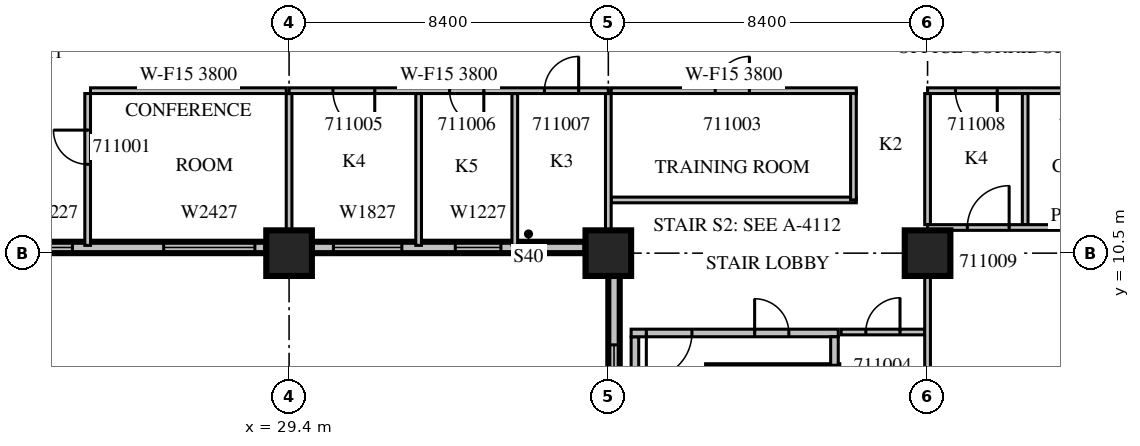
"""IFC4 building model, lengths in metres.
Left out: names, types, materials, properties, quantities, classifications, styles, units other than length and angle.
Written with IfcOpenShell. Run it as: python <this file> out.ifc"""

import sys

from ifc_helpers import new_model, si_unit, direction, frame, frame_2d, origin, origin_2d, place, context, subcontext, project, spatial, rectangle, extrude, source, transform, mapped, element, fill, save


model = new_model("IFC4")
c1 = context("Model", 3, precision=1e-05, world=origin(), true_north=direction((0.0, 1.0)))
c2 = subcontext(c1, "Body", "Model", "MODEL_VIEW")
j1 = project(units=[si_unit("LENGTHUNIT", "METRE"), si_unit("PLANEANGLEUNIT", "RADIAN")], contexts=[c1])
p1 = place(None, origin())
s1 = spatial("IfcSite", under=j1, at=p1, CompositionType="ELEMENT")
p2 = place(p1, origin())
s2 = spatial("IfcBuilding", under=s1, at=p2, CompositionType="ELEMENT")
p3 = place(p2, frame((0.0, 0.0, 57.3)))
s3 = spatial("IfcBuildingStorey", under=s2, at=p3, CompositionType="ELEMENT", Elevation=57.3)
m1 = source(origin(), c2, "Body", "SweptSolid", [
    extrude(rectangle(XDim=1.2, YDim=1.2, at=origin_2d()), origin(), (0.0, 0.0, 1.0), 4.2),
])
for number, where, z_axis, x_axis in (
    (1, (29.4, 10.5, 0.0), (0.0, 0.0, 1.0), (1.0, 0.0, 0.0)),
    (2, (37.8, 10.5, 0.0), (0.0, 0.0, 1.0), (1.0, 0.0, 0.0)),
    (3, (46.2, 10.5, 0.0), (0.0, 0.0, 1.0), (1.0, 0.0, 0.0)),
):
    element("IfcColumn", number, at=place(p3, frame(where, z_axis=z_axis, x_axis=x_axis)), inside=s3, PredefinedType="COLUMN", context=c2, shape_type="MappedRepresentation", body=[
        mapped(m1, transform((0.0, 0.0, 0.0), scale=1.0)),
    ])
m2 = source(origin(), c2, "Body", "SweptSolid", [
    extrude(rectangle(XDim=6.6, YDim=0.3, at=frame_2d((3.3, 0.0))), origin(), (0.0, 0.0, 1.0), 3.8),
])
p4 = place(p3, frame((22.2, 10.65, 0.0), z_axis=(0.0, 0.0, 1.0), x_axis=(1.0, 0.0, 0.0)))
e4 = element("IfcWall", 4, at=p4, inside=s3, PredefinedType="STANDARD", context=c2, shape_type="MappedRepresentation", body=[
    mapped(m2, transform((0.0, 0.0, 0.0), scale=1.0)),
])
m3 = source(origin(), c2, "Body", "SweptSolid", [
    extrude(rectangle(XDim=1.2, YDim=2.7, at=frame_2d((0.6, 1.35))), frame((0.0, 0.16, 0.0), z_axis=(0.0, -1.0, 0.0), x_axis=(1.0, 0.0, 0.0)), (0.0, 0.0, 1.0), 0.32),
])
p5 = place(p4, frame((0.3, 0.0, 0.6)))
e5 = element("IfcOpeningElement", 5, at=p5, cuts=e4, PredefinedType="OPENING", context=c2, shape_type="MappedRepresentation", body=[
    mapped(m3, transform((0.0, 0.0, 0.0), scale=1.0)),
])
m4 = source(origin(), c2, "Body", "SweptSolid", [
    extrude(rectangle(XDim=2.4, YDim=2.7, at=frame_2d((1.2, 1.35))), frame((0.0, 0.16, 0.0), z_axis=(0.0, -1.0, 0.0), x_axis=(1.0, 0.0, 0.0)), (0.0, 0.0, 1.0), 0.32),
])
p6 = place(p4, frame((3.9, 0.0, 0.6)))
e6 = element("IfcOpeningElement", 6, at=p6, cuts=e4, PredefinedType="OPENING", context=c2, shape_type="MappedRepresentation", body=[
    mapped(m4, transform((0.0, 0.0, 0.0), scale=1.0)),
])
m5 = source(origin(), c2, "Body", "SweptSolid", [
    extrude(rectangle(XDim=7.2, YDim=0.3, at=frame_2d((3.6, 0.0))), origin(), (0.0, 0.0, 1.0), 3.8),
])
p7 = place(p3, frame((30.0, 10.65, 0.0), z_axis=(0.0, 0.0, 1.0), x_axis=(1.0, 0.0, 0.0)))
e7 = element("IfcWall", 7, at=p7, inside=s3, PredefinedType="STANDARD", context=c2, shape_type="MappedRepresentation", body=[
    mapped(m5, transform((0.0, 0.0, 0.0), scale=1.0)),
])
m6 = source(origin(), c2, "Body", "SweptSolid", [
    extrude(rectangle(XDim=1.8, YDim=2.7, at=frame_2d((0.9, 1.35))), frame((0.0, 0.16, 0.0), z_axis=(0.0, -1.0, 0.0), x_axis=(1.0, 0.0, 0.0)), (0.0, 0.0, 1.0), 0.32),
])
p8 = place(p7, frame((0.567, 0.0, 0.6)))
e8 = element("IfcOpeningElement", 8, at=p8, cuts=e7, PredefinedType="OPENING", context=c2, shape_type="MappedRepresentation", body=[
    mapped(m6, transform((0.0, 0.0, 0.0), scale=1.0)),
])
p9 = place(p7, frame((3.774, 0.0, 0.6)))
e9 = element("IfcOpeningElement", 9, at=p9, cuts=e7, PredefinedType="OPENING", context=c2, shape_type="MappedRepresentation", body=[
    mapped(m3, transform((0.0, 0.0, 0.0), scale=1.0)),
])
m7 = source(origin(), c2, "Body", "SweptSolid", [
    extrude(rectangle(XDim=8.7, YDim=0.3, at=frame_2d((4.35, 0.0))), origin(), (0.0, 0.0, 1.0), 3.8),
])
p10 = place(p3, frame((37.95, 9.9, 0.0), z_axis=(0.0, 0.0, 1.0), x_axis=(0.0, -1.0, 0.0)))
e10 = element("IfcWall", 10, at=p10, inside=s3, PredefinedType="STANDARD", context=c2, shape_type="MappedRepresentation", body=[
    mapped(m7, transform((0.0, 0.0, 0.0), scale=1.0)),
])
p11 = place(p10, frame((1.812, 0.0, 0.6)))
e11 = element("IfcOpeningElement", 11, at=p11, cuts=e10, PredefinedType="OPENING", context=c2, shape_type="MappedRepresentation", body=[
    mapped(m6, transform((0.0, 0.0, 0.0), scale=1.0)),
])
p12 = place(p10, frame((6.075, 0.0, 0.6)))
e12 = element("IfcOpeningElement", 12, at=p12, cuts=e10, PredefinedType="OPENING", context=c2, shape_type="MappedRepresentation", body=[
    mapped(m4, transform((0.0, 0.0, 0.0), scale=1.0)),
])
m8 = source(origin(), c2, "Body", "SweptSolid", [
    extrude(rectangle(XDim=3.45, YDim=0.25, at=frame_2d((1.725, 0.0))), origin(), (0.0, 0.0, 1.0), 3.8),
])
p13 = place(p3, frame((40.4, 7.425, 0.0), z_axis=(0.0, 0.0, 1.0), x_axis=(1.0, 0.0, 0.0)))
e13 = element("IfcWall", 13, at=p13, inside=s3, PredefinedType="SOLIDWALL", context=c2, shape_type="MappedRepresentation", body=[
    mapped(m8, transform((0.0, 0.0, 0.0), scale=1.0)),
])
m9 = source(origin(), c2, "Body", "SweptSolid", [
    extrude(rectangle(XDim=8.0, YDim=0.2, at=frame_2d((4.0, 0.0))), origin(), (0.0, 0.0, 1.0), 3.8),
])
p14 = place(p3, frame((38.5, 0.3, 0.0), z_axis=(0.0, 0.0, 1.0), x_axis=(0.0, 1.0, 0.0)))
e14 = element("IfcWall", 14, at=p14, inside=s3, PredefinedType="PARTITIONING", context=c2, shape_type="MappedRepresentation", body=[
    mapped(m9, transform((0.0, 0.0, 0.0), scale=1.0)),
])
m10 = source(origin(), c2, "Body", "SweptSolid", [
    extrude(rectangle(XDim=5.45, YDim=0.2, at=frame_2d((2.725, 0.0))), origin(), (0.0, 0.0, 1.0), 3.8),
])
p15 = place(p3, frame((38.4, 8.4, 0.0), z_axis=(0.0, 0.0, 1.0), x_axis=(1.0, 0.0, 0.0)))
e15 = element("IfcWall", 15, at=p15, inside=s3, PredefinedType="PARTITIONING", context=c2, shape_type="MappedRepresentation", body=[
    mapped(m10, transform((0.0, 0.0, 0.0), scale=1.0)),
])
m11 = source(origin(), c2, "Body", "SweptSolid", [
    extrude(rectangle(XDim=1.2, YDim=2.1, at=frame_2d((0.6, 1.05))), frame((0.0, 0.11, 0.0), z_axis=(0.0, -1.0, 0.0), x_axis=(1.0, 0.0, 0.0)), (0.0, 0.0, 1.0), 0.22),
])
p16 = place(p15, frame((0.4, 0.0, 0.0)))
e16 = element("IfcOpeningElement", 16, at=p16, cuts=e15, PredefinedType="OPENING", context=c2, shape_type="MappedRepresentation", body=[
    mapped(m11, transform((0.0, 0.0, 0.0), scale=1.0)),
])
m12 = source(origin(), c2, "Body", "SweptSolid", [
    extrude(rectangle(XDim=0.9, YDim=2.1, at=frame_2d((0.45, 1.05))), frame((0.0, 0.11, 0.0), z_axis=(0.0, -1.0, 0.0), x_axis=(1.0, 0.0, 0.0)), (0.0, 0.0, 1.0), 0.22),
])
p17 = place(p15, frame((3.25, 0.0, 0.0)))
e17 = element("IfcOpeningElement", 17, at=p17, cuts=e15, PredefinedType="OPENING", context=c2, shape_type="MappedRepresentation", body=[
    mapped(m12, transform((0.0, 0.0, 0.0), scale=1.0)),
])
m13 = source(origin(), c2, "Body", "SweptSolid", [
    extrude(rectangle(XDim=0.75, YDim=0.2, at=frame_2d((0.375, 0.0))), origin(), (0.0, 0.0, 1.0), 3.8),
])
p18 = place(p3, frame((43.75, 7.55, 0.0), z_axis=(0.0, 0.0, 1.0), x_axis=(0.0, 1.0, 0.0)))
e18 = element("IfcWall", 18, at=p18, inside=s3, PredefinedType="PARTITIONING", context=c2, shape_type="MappedRepresentation", body=[
    mapped(m13, transform((0.0, 0.0, 0.0), scale=1.0)),
])
p19 = place(p3, frame((24.1, 14.7, 0.0), z_axis=(0.0, 0.0, 1.0), x_axis=(0.0, -1.0, 0.0)))
e19 = element("IfcWall", 19, at=p19, inside=s3, PredefinedType="PARTITIONING", context=c2, shape_type="SweptSolid", body=[
    extrude(rectangle(XDim=3.995, YDim=0.15, at=frame_2d((1.998, 0.0))), origin(), (0.0, 0.0, 1.0), 3.8),
])
m14 = source(origin(), c2, "Body", "SweptSolid", [
    extrude(rectangle(XDim=0.9, YDim=2.1, at=frame_2d((0.45, 1.05))), frame((0.0, 0.085, 0.0), z_axis=(0.0, -1.0, 0.0), x_axis=(1.0, 0.0, 0.0)), (0.0, 0.0, 1.0), 0.17),
])
p20 = place(p19, frame((0.963, 0.0, 0.0)))
e20 = element("IfcOpeningElement", 20, at=p20, cuts=e19, PredefinedType="OPENING", context=c2, shape_type="MappedRepresentation", body=[
    mapped(m14, transform((0.0, 0.0, 0.0), scale=1.0)),
])
m15 = source(origin(), c2, "Body", "SweptSolid", [
    extrude(rectangle(XDim=5.15, YDim=0.15, at=frame_2d((2.575, 0.0))), origin(), (0.0, 0.0, 1.0), 3.8),
])
p21 = place(p3, frame((29.325, 14.775, 0.0), z_axis=(0.0, 0.0, 1.0), x_axis=(-1.0, 0.0, 0.0)))
e21 = element("IfcWall", 21, at=p21, inside=s3, PredefinedType="PARTITIONING", context=c2, shape_type="MappedRepresentation", body=[
    mapped(m15, transform((0.0, 0.0, 0.0), scale=1.0)),
])
p22 = place(p3, frame((29.4, 11.099, 0.0), z_axis=(0.0, 0.0, 1.0), x_axis=(0.0, 1.0, 0.0)))
e22 = element("IfcWall", 22, at=p22, inside=s3, PredefinedType="PARTITIONING", context=c2, shape_type="SweptSolid", body=[
    extrude(rectangle(XDim=3.601, YDim=0.15, at=frame_2d((1.8, 0.0))), origin(), (0.0, 0.0, 1.0), 3.8),
])
m16 = source(origin(), c2, "Body", "SweptSolid", [
    extrude(rectangle(XDim=6.45, YDim=0.15, at=frame_2d((3.225, 0.0))), origin(), (0.0, 0.0, 1.0), 3.8),
])
p23 = place(p3, frame((37.875, 11.9, 0.0), z_axis=(0.0, 0.0, 1.0), x_axis=(1.0, 0.0, 0.0)))
e23 = element("IfcWall", 23, at=p23, inside=s3, PredefinedType="PARTITIONING", context=c2, shape_type="MappedRepresentation", body=[
    mapped(m16, transform((0.0, 0.0, 0.0), scale=1.0)),
])
p24 = place(p3, frame((44.25, 11.9, 0.0), z_axis=(0.0, 0.0, 1.0), x_axis=(0.0, 1.0, 0.0)))
e24 = element("IfcWall", 24, at=p24, inside=s3, PredefinedType="PARTITIONING", context=c2, shape_type="SweptSolid", body=[
    extrude(rectangle(XDim=2.875, YDim=0.15, at=frame_2d((1.438, 0.0))), origin(), (0.0, 0.0, 1.0), 3.8),
])
p25 = place(p3, frame((44.325, 14.775, 0.0), z_axis=(0.0, 0.0, 1.0), x_axis=(-1.0, 0.0, 0.0)))
e25 = element("IfcWall", 25, at=p25, inside=s3, PredefinedType="PARTITIONING", context=c2, shape_type="MappedRepresentation", body=[
    mapped(m16, transform((0.0, 0.0, 0.0), scale=1.0)),
])
p26 = place(p25, frame((2.812, 0.0, 0.0)))
e26 = element("IfcOpeningElement", 26, at=p26, cuts=e25, PredefinedType="OPENING", context=c2, shape_type="MappedRepresentation", body=[
    mapped(m14, transform((0.0, 0.0, 0.0), scale=1.0)),
])
m17 = source(origin(), c2, "Body", "SweptSolid", [
    extrude(rectangle(XDim=2.2, YDim=0.15, at=frame_2d((1.1, 0.0))), origin(), (0.0, 0.0, 1.0), 3.8),
])
p27 = place(p3, frame((46.125, 8.425, 0.0), z_axis=(0.0, 0.0, 1.0), x_axis=(-1.0, 0.0, 0.0)))
e27 = element("IfcWall", 27, at=p27, inside=s3, PredefinedType="PARTITIONING", context=c2, shape_type="MappedRepresentation", body=[
    mapped(m17, transform((0.0, 0.0, 0.0), scale=1.0)),
])
p28 = place(p27, frame((0.65, 0.0, 0.0)))
e28 = element("IfcOpeningElement", 28, at=p28, cuts=e27, PredefinedType="OPENING", context=c2, shape_type="MappedRepresentation", body=[
    mapped(m14, transform((0.0, 0.0, 0.0), scale=1.0)),
])
m18 = source(origin(), c2, "Body", "SweptSolid", [
    extrude(rectangle(XDim=3.995, YDim=0.15, at=frame_2d((1.998, 0.0))), origin(), (0.0, 0.0, 1.0), 3.8),
])
for number, where, z_axis, x_axis in (
    (29, (32.809, 10.705, 0.0), (0.0, 0.0, 1.0), (0.0, 1.0, 0.0)),
    (30, (35.339, 10.705, 0.0), (0.0, 0.0, 1.0), (0.0, 1.0, 0.0)),
):
    element("IfcWall", number, at=place(p3, frame(where, z_axis=z_axis, x_axis=x_axis)), inside=s3, PredefinedType="PARTITIONING", context=c2, shape_type="MappedRepresentation", body=[
        mapped(m18, transform((0.0, 0.0, 0.0), scale=1.0)),
    ])
m19 = source(origin(), c2, "Body", "SweptSolid", [
    extrude(rectangle(XDim=3.601, YDim=0.15, at=frame_2d((1.8, 0.0))), origin(), (0.0, 0.0, 1.0), 3.8),
])
p29 = place(p3, frame((37.8, 11.099, 0.0), z_axis=(0.0, 0.0, 1.0), x_axis=(0.0, 1.0, 0.0)))
e31 = element("IfcWall", 31, at=p29, inside=s3, PredefinedType="PARTITIONING", context=c2, shape_type="MappedRepresentation", body=[
    mapped(m19, transform((0.0, 0.0, 0.0), scale=1.0)),
])
p30 = place(p3, frame((48.768, 11.25, 0.0), z_axis=(0.0, 0.0, 1.0), x_axis=(0.0, 1.0, 0.0)))
e32 = element("IfcWall", 32, at=p30, inside=s3, PredefinedType="PARTITIONING", context=c2, shape_type="SweptSolid", body=[
    extrude(rectangle(XDim=3.45, YDim=0.15, at=frame_2d((1.725, 0.0))), origin(), (0.0, 0.0, 1.0), 3.8),
])
m20 = source(origin(), c2, "Body", "SweptSolid", [
    extrude(rectangle(XDim=8.702, YDim=0.15, at=frame_2d((4.351, 0.0))), origin(), (0.0, 0.0, 1.0), 3.8),
])
p31 = place(p3, frame((46.2, 1.199, 0.0), z_axis=(0.0, 0.0, 1.0), x_axis=(0.0, 1.0, 0.0)))
e33 = element("IfcWall", 33, at=p31, inside=s3, PredefinedType="PARTITIONING", context=c2, shape_type="MappedRepresentation", body=[
    mapped(m20, transform((0.0, 0.0, 0.0), scale=1.0)),
])
m21 = source(origin(), c2, "Body", "SweptSolid", [
    extrude(rectangle(XDim=3.45, YDim=0.15, at=frame_2d((1.725, 0.0))), origin(), (0.0, 0.0, 1.0), 3.8),
])
p32 = place(p3, frame((46.2, 11.25, 0.0), z_axis=(0.0, 0.0, 1.0), x_axis=(0.0, 1.0, 0.0)))
e34 = element("IfcWall", 34, at=p32, inside=s3, PredefinedType="PARTITIONING", context=c2, shape_type="MappedRepresentation", body=[
    mapped(m21, transform((0.0, 0.0, 0.0), scale=1.0)),
])
m22 = source(origin(), c2, "Body", "SweptSolid", [
    extrude(rectangle(XDim=24.9, YDim=0.15, at=frame_2d((12.45, 0.0))), origin(), (0.0, 0.0, 1.0), 3.8),
])
p33 = place(p3, frame((71.1, 11.175, 0.0), z_axis=(0.0, 0.0, 1.0), x_axis=(-1.0, 0.0, 0.0)))
e35 = element("IfcWall", 35, at=p33, inside=s3, PredefinedType="PARTITIONING", context=c2, shape_type="MappedRepresentation", body=[
    mapped(m22, transform((0.0, 0.0, 0.0), scale=1.0)),
])
m23 = source(origin(), c2, "Body", "SweptSolid", [
    extrude(rectangle(XDim=1.1, YDim=2.1, at=frame_2d((0.55, 1.05))), frame((0.0, 0.085, 0.0), z_axis=(0.0, -1.0, 0.0), x_axis=(1.0, 0.0, 0.0)), (0.0, 0.0, 1.0), 0.17),
])
p34 = place(p33, frame((22.753, 0.0, 0.0)))
e36 = element("IfcOpeningElement", 36, at=p34, cuts=e35, PredefinedType="OPENING", context=c2, shape_type="MappedRepresentation", body=[
    mapped(m23, transform((0.0, 0.0, 0.0), scale=1.0)),
])
p35 = place(p33, frame((8.683, 0.0, 0.0)))
e37 = element("IfcOpeningElement", 37, at=p35, cuts=e35, PredefinedType="OPENING", context=c2, shape_type="MappedRepresentation", body=[
    mapped(m23, transform((0.0, 0.0, 0.0), scale=1.0)),
])
p36 = place(p33, frame((4.738, 0.0, 0.0)))
e38 = element("IfcOpeningElement", 38, at=p36, cuts=e35, PredefinedType="OPENING", context=c2, shape_type="MappedRepresentation", body=[
    mapped(m23, transform((0.0, 0.0, 0.0), scale=1.0)),
])
m24 = source(origin(), c2, "Body", "SweptSolid", [
    extrude(rectangle(XDim=8.4, YDim=0.15, at=frame_2d((4.2, 0.0))), origin(), (0.0, 0.0, 1.0), 3.8),
])
p37 = place(p3, frame((37.8, 14.775, 0.0), z_axis=(0.0, 0.0, 1.0), x_axis=(-1.0, 0.0, 0.0)))
e39 = element("IfcWall", 39, at=p37, inside=s3, PredefinedType="PARTITIONING", context=c2, shape_type="MappedRepresentation", body=[
    mapped(m24, transform((0.0, 0.0, 0.0), scale=1.0)),
])
p38 = place(p37, frame((6.146, 0.0, 0.0)))
e40 = element("IfcOpeningElement", 40, at=p38, cuts=e39, PredefinedType="OPENING", context=c2, shape_type="MappedRepresentation", body=[
    mapped(m23, transform((0.0, 0.0, 0.0), scale=1.0)),
])
p39 = place(p37, frame((3.276, 0.0, 0.0)))
e41 = element("IfcOpeningElement", 41, at=p39, cuts=e39, PredefinedType="OPENING", context=c2, shape_type="MappedRepresentation", body=[
    mapped(m14, transform((0.0, 0.0, 0.0), scale=1.0)),
])
p40 = place(p37, frame((0.781, 0.0, 0.0)))
e42 = element("IfcOpeningElement", 42, at=p40, cuts=e39, PredefinedType="OPENING", context=c2, shape_type="MappedRepresentation", body=[
    mapped(m14, transform((0.0, 0.0, 0.0), scale=1.0)),
])
p41 = place(p3, frame((71.1, 14.775, 0.0), z_axis=(0.0, 0.0, 1.0), x_axis=(-1.0, 0.0, 0.0)))
e43 = element("IfcWall", 43, at=p41, inside=s3, PredefinedType="PARTITIONING", context=c2, shape_type="MappedRepresentation", body=[
    mapped(m22, transform((0.0, 0.0, 0.0), scale=1.0)),
])
p42 = place(p41, frame((23.066, 0.0, 0.0)))
e44 = element("IfcOpeningElement", 44, at=p42, cuts=e43, PredefinedType="OPENING", context=c2, shape_type="MappedRepresentation", body=[
    mapped(m23, transform((0.0, 0.0, 0.0), scale=1.0)),
])
p43 = place(p41, frame((20.226, 0.0, 0.0)))
e45 = element("IfcOpeningElement", 45, at=p43, cuts=e43, PredefinedType="OPENING", context=c2, shape_type="MappedRepresentation", body=[
    mapped(m14, transform((0.0, 0.0, 0.0), scale=1.0)),
])
p44 = place(p41, frame((8.42, 0.0, 0.0)))
e46 = element("IfcOpeningElement", 46, at=p44, cuts=e43, PredefinedType="OPENING", context=c2, shape_type="MappedRepresentation", body=[
    mapped(m23, transform((0.0, 0.0, 0.0), scale=1.0)),
])
p45 = place(p41, frame((15.63, 0.0, 0.0)))
e47 = element("IfcOpeningElement", 47, at=p45, cuts=e43, PredefinedType="OPENING", context=c2, shape_type="MappedRepresentation", body=[
    mapped(m14, transform((0.0, 0.0, 0.0), scale=1.0)),
])
p46 = place(p41, frame((11.46, 0.0, 0.0)))
e48 = element("IfcOpeningElement", 48, at=p46, cuts=e43, PredefinedType="OPENING", context=c2, shape_type="MappedRepresentation", body=[
    mapped(m14, transform((0.0, 0.0, 0.0), scale=1.0)),
])
p47 = place(p41, frame((5.051, 0.0, 0.0)))
e49 = element("IfcOpeningElement", 49, at=p47, cuts=e43, PredefinedType="OPENING", context=c2, shape_type="MappedRepresentation", body=[
    mapped(m23, transform((0.0, 0.0, 0.0), scale=1.0)),
])
p48 = place(p41, frame((1.483, 0.0, 0.0)))
e50 = element("IfcOpeningElement", 50, at=p48, cuts=e43, PredefinedType="OPENING", context=c2, shape_type="MappedRepresentation", body=[
    mapped(m14, transform((0.0, 0.0, 0.0), scale=1.0)),
])
m25 = source(origin(), c2, "Body", "SweptSolid", [
    extrude(rectangle(XDim=1.2, YDim=2.7, at=frame_2d((0.6, 1.35))), frame((0.0, 0.03, 0.0), z_axis=(0.0, -1.0, 0.0), x_axis=(1.0, 0.0, 0.0)), (0.0, 0.0, 1.0), 0.06),
])
p49 = place(p5, origin())
e51 = element("IfcWindow", 51, at=p49, inside=s3, PartitioningType="SINGLE_PANEL", PredefinedType="WINDOW", context=c2, shape_type="MappedRepresentation", body=[
    mapped(m25, transform((0.0, 0.0, 0.0), scale=1.0)),
])
fill(e5, e51)
m26 = source(origin(), c2, "Body", "SweptSolid", [
    extrude(rectangle(XDim=2.4, YDim=2.7, at=frame_2d((1.2, 1.35))), frame((0.0, 0.03, 0.0), z_axis=(0.0, -1.0, 0.0), x_axis=(1.0, 0.0, 0.0)), (0.0, 0.0, 1.0), 0.06),
])
p50 = place(p6, origin())
e52 = element("IfcWindow", 52, at=p50, inside=s3, PartitioningType="SINGLE_PANEL", PredefinedType="WINDOW", context=c2, shape_type="MappedRepresentation", body=[
    mapped(m26, transform((0.0, 0.0, 0.0), scale=1.0)),
])
fill(e6, e52)
m27 = source(origin(), c2, "Body", "SweptSolid", [
    extrude(rectangle(XDim=1.8, YDim=2.7, at=frame_2d((0.9, 1.35))), frame((0.0, 0.03, 0.0), z_axis=(0.0, -1.0, 0.0), x_axis=(1.0, 0.0, 0.0)), (0.0, 0.0, 1.0), 0.06),
])
p51 = place(p8, origin())
e53 = element("IfcWindow", 53, at=p51, inside=s3, PartitioningType="SINGLE_PANEL", PredefinedType="WINDOW", context=c2, shape_type="MappedRepresentation", body=[
    mapped(m27, transform((0.0, 0.0, 0.0), scale=1.0)),
])
fill(e8, e53)
p52 = place(p9, origin())
e54 = element("IfcWindow", 54, at=p52, inside=s3, PartitioningType="SINGLE_PANEL", PredefinedType="WINDOW", context=c2, shape_type="MappedRepresentation", body=[
    mapped(m25, transform((0.0, 0.0, 0.0), scale=1.0)),
])
fill(e9, e54)
p53 = place(p11, origin())
e55 = element("IfcWindow", 55, at=p53, inside=s3, PartitioningType="SINGLE_PANEL", PredefinedType="WINDOW", context=c2, shape_type="MappedRepresentation", body=[
    mapped(m27, transform((0.0, 0.0, 0.0), scale=1.0)),
])
fill(e11, e55)
m28 = source(origin(), c2, "Body", "SweptSolid", [
    extrude(rectangle(XDim=1.2, YDim=2.1, at=frame_2d((0.6, 1.05))), frame((0.0, 0.025, 0.0), z_axis=(0.0, -1.0, 0.0), x_axis=(1.0, 0.0, 0.0)), (0.0, 0.0, 1.0), 0.05),
])
p54 = place(p16, origin())
e56 = element("IfcDoor", 56, at=p54, inside=s3, OperationType="SINGLE_SWING_RIGHT", PredefinedType="DOOR", context=c2, shape_type="MappedRepresentation", body=[
    mapped(m28, transform((0.0, 0.0, 0.0), scale=1.0)),
])
fill(e16, e56)
m29 = source(origin(), c2, "Body", "SweptSolid", [
    extrude(rectangle(XDim=0.9, YDim=2.1, at=frame_2d((0.45, 1.05))), frame((0.0, 0.025, 0.0), z_axis=(0.0, -1.0, 0.0), x_axis=(1.0, 0.0, 0.0)), (0.0, 0.0, 1.0), 0.05),
])
p55 = place(p17, origin())
e57 = element("IfcDoor", 57, at=p55, inside=s3, OperationType="SINGLE_SWING_LEFT", PredefinedType="DOOR", context=c2, shape_type="MappedRepresentation", body=[
    mapped(m29, transform((0.0, 0.0, 0.0), scale=1.0)),
])
fill(e17, e57)
p56 = place(p20, origin())
e58 = element("IfcDoor", 58, at=p56, inside=s3, OperationType="SINGLE_SWING_RIGHT", PredefinedType="DOOR", context=c2, shape_type="MappedRepresentation", body=[
    mapped(m29, transform((0.0, 0.0, 0.0), scale=1.0)),
])
fill(e20, e58)
p57 = place(p26, origin())
e59 = element("IfcDoor", 59, at=p57, inside=s3, OperationType="SINGLE_SWING_RIGHT", PredefinedType="DOOR", context=c2, shape_type="MappedRepresentation", body=[
    mapped(m29, transform((0.0, 0.0, 0.0), scale=1.0)),
])
fill(e26, e59)
p58 = place(p28, origin())
e60 = element("IfcDoor", 60, at=p58, inside=s3, OperationType="SINGLE_SWING_RIGHT", PredefinedType="DOOR", context=c2, shape_type="MappedRepresentation", body=[
    mapped(m29, transform((0.0, 0.0, 0.0), scale=1.0)),
])
fill(e28, e60)
m30 = source(origin(), c2, "Body", "SweptSolid", [
    extrude(rectangle(XDim=1.1, YDim=2.1, at=frame_2d((0.55, 1.05))), frame((0.0, 0.025, 0.0), z_axis=(0.0, -1.0, 0.0), x_axis=(1.0, 0.0, 0.0)), (0.0, 0.0, 1.0), 0.05),
])
p59 = place(p38, origin())
e61 = element("IfcDoor", 61, at=p59, inside=s3, OperationType="SINGLE_SWING_LEFT", PredefinedType="DOOR", context=c2, shape_type="MappedRepresentation", body=[
    mapped(m30, transform((0.0, 0.0, 0.0), scale=1.0)),
])
fill(e40, e61)
p60 = place(p39, origin())
e62 = element("IfcDoor", 62, at=p60, inside=s3, OperationType="SINGLE_SWING_LEFT", PredefinedType="DOOR", context=c2, shape_type="MappedRepresentation", body=[
    mapped(m29, transform((0.0, 0.0, 0.0), scale=1.0)),
])
fill(e41, e62)
p61 = place(p40, origin())
e63 = element("IfcDoor", 63, at=p61, inside=s3, OperationType="SINGLE_SWING_RIGHT", PredefinedType="DOOR", context=c2, shape_type="MappedRepresentation", body=[
    mapped(m29, transform((0.0, 0.0, 0.0), scale=1.0)),
])
fill(e42, e63)
p62 = place(p42, origin())
e64 = element("IfcDoor", 64, at=p62, inside=s3, OperationType="SINGLE_SWING_LEFT", PredefinedType="DOOR", context=c2, shape_type="MappedRepresentation", body=[
    mapped(m30, transform((0.0, 0.0, 0.0), scale=1.0)),
])
fill(e44, e64)
p63 = place(p34, origin())
e65 = element("IfcDoor", 65, at=p63, inside=s3, OperationType="SINGLE_SWING_RIGHT", PredefinedType="DOOR", context=c2, shape_type="MappedRepresentation", body=[
    mapped(m30, transform((0.0, 0.0, 0.0), scale=1.0)),
])
fill(e36, e65)
save(model, sys.argv[1])
